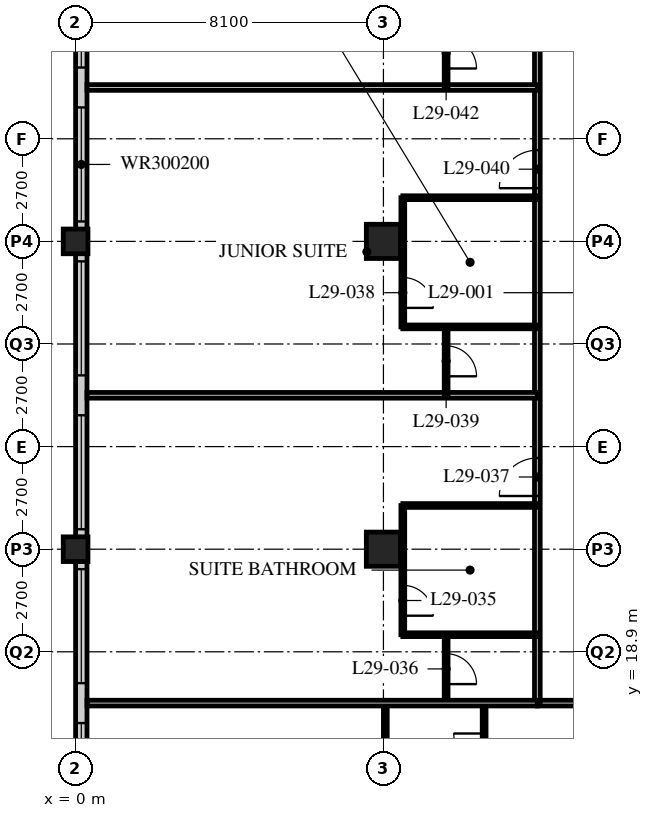
"""IFC4 building model, lengths in metres.
Left out: names, types, materials, properties, quantities, classifications, styles, units other than length and angle.
Written with IfcOpenShell. Run it as: python <this file> out.ifc"""

import sys

from ifc_helpers import new_model, si_unit, direction, frame, frame_2d, origin, origin_2d, place, context, subcontext, project, spatial, rectangle, hollow_rectangle, extrude, element, fill, save


model = new_model("IFC4")
c1 = context("Model", 3, precision=1e-05, world=origin(), true_north=direction((0.0, 1.0)))
c2 = subcontext(c1, "Body", "Model", "MODEL_VIEW")
j1 = project(units=[si_unit("LENGTHUNIT", "METRE"), si_unit("PLANEANGLEUNIT", "RADIAN")], contexts=[c1])
p1 = place(None, origin())
s1 = spatial("IfcSite", under=j1, at=p1, CompositionType="ELEMENT")
p2 = place(p1, origin())
s2 = spatial("IfcBuilding", under=s1, at=p2, CompositionType="ELEMENT")
p3 = place(p2, frame((0.0, 0.0, 117.0)))
s3 = spatial("IfcBuildingStorey", under=s2, at=p3, CompositionType="ELEMENT", Elevation=117.0)
for number, where, z_axis, x_axis in (
    (1, (0.0, 21.6, 0.0), (0.0, 0.0, 1.0), (1.0, 0.0, 0.0)),
    (2, (0.0, 29.7, 0.0), (0.0, 0.0, 1.0), (1.0, 0.0, 0.0)),
):
    element("IfcColumn", number, at=place(p3, frame(where, z_axis=z_axis, x_axis=x_axis)), inside=s3, PredefinedType="COLUMN", context=c2, shape_type="SweptSolid", body=[
        extrude(hollow_rectangle(XDim=0.65, YDim=0.65, WallThickness=0.055, at=origin_2d()), origin(), (0.0, 0.0, 1.0), 3.4),
    ])
for number, where, z_axis, x_axis in (
    (3, (8.1, 21.6, 0.0), (0.0, 0.0, 1.0), (1.0, 0.0, 0.0)),
    (4, (8.1, 29.7, 0.0), (0.0, 0.0, 1.0), (1.0, 0.0, 0.0)),
):
    element("IfcColumn", number, at=place(p3, frame(where, z_axis=z_axis, x_axis=x_axis)), inside=s3, PredefinedType="COLUMN", context=c2, shape_type="SweptSolid", body=[
        extrude(hollow_rectangle(XDim=0.9, YDim=0.9, WallThickness=0.09, at=origin_2d()), origin(), (0.0, 0.0, 1.0), 3.4),
    ])
p4 = place(p3, frame((0.15, 45.6, 0.0), z_axis=(0.0, 0.0, 1.0), x_axis=(0.0, -1.0, 0.0)))
e5 = element("IfcWall", 5, at=p4, inside=s3, PredefinedType="SOLIDWALL", context=c2, shape_type="SweptSolid", body=[
    extrude(rectangle(XDim=32.1, YDim=0.3, at=frame_2d((16.05, 0.0))), origin(), (0.0, 0.0, 1.0), 3.19),
])
p5 = place(p4, frame((0.225, 0.0, 0.9)))
e6 = element("IfcOpeningElement", 6, at=p5, cuts=e5, PredefinedType="OPENING", context=c2, shape_type="SweptSolid", body=[
    extrude(rectangle(XDim=3.0, YDim=2.0, at=frame_2d((1.5, 1.0))), frame((0.0, 0.16, 0.0), z_axis=(0.0, -1.0, 0.0), x_axis=(1.0, 0.0, 0.0)), (0.0, 0.0, 1.0), 0.32),
])
p6 = place(p4, frame((4.275, 0.0, 0.9)))
e7 = element("IfcOpeningElement", 7, at=p6, cuts=e5, PredefinedType="OPENING", context=c2, shape_type="SweptSolid", body=[
    extrude(rectangle(XDim=3.0, YDim=2.0, at=frame_2d((1.5, 1.0))), frame((0.0, 0.16, 0.0), z_axis=(0.0, -1.0, 0.0), x_axis=(1.0, 0.0, 0.0)), (0.0, 0.0, 1.0), 0.32),
])
p7 = place(p4, frame((8.325, 0.0, 0.9)))
e8 = element("IfcOpeningElement", 8, at=p7, cuts=e5, PredefinedType="OPENING", context=c2, shape_type="SweptSolid", body=[
    extrude(rectangle(XDim=3.0, YDim=2.0, at=frame_2d((1.5, 1.0))), frame((0.0, 0.16, 0.0), z_axis=(0.0, -1.0, 0.0), x_axis=(1.0, 0.0, 0.0)), (0.0, 0.0, 1.0), 0.32),
])
p8 = place(p4, frame((12.375, 0.0, 0.9)))
e9 = element("IfcOpeningElement", 9, at=p8, cuts=e5, PredefinedType="OPENING", context=c2, shape_type="SweptSolid", body=[
    extrude(rectangle(XDim=3.0, YDim=2.0, at=frame_2d((1.5, 1.0))), frame((0.0, 0.16, 0.0), z_axis=(0.0, -1.0, 0.0), x_axis=(1.0, 0.0, 0.0)), (0.0, 0.0, 1.0), 0.32),
])
p9 = place(p4, frame((16.425, 0.0, 0.9)))
e10 = element("IfcOpeningElement", 10, at=p9, cuts=e5, PredefinedType="OPENING", context=c2, shape_type="SweptSolid", body=[
    extrude(rectangle(XDim=3.0, YDim=2.0, at=frame_2d((1.5, 1.0))), frame((0.0, 0.16, 0.0), z_axis=(0.0, -1.0, 0.0), x_axis=(1.0, 0.0, 0.0)), (0.0, 0.0, 1.0), 0.32),
])
p10 = place(p4, frame((20.475, 0.0, 0.9)))
e11 = element("IfcOpeningElement", 11, at=p10, cuts=e5, PredefinedType="OPENING", context=c2, shape_type="SweptSolid", body=[
    extrude(rectangle(XDim=3.0, YDim=2.0, at=frame_2d((1.5, 1.0))), frame((0.0, 0.16, 0.0), z_axis=(0.0, -1.0, 0.0), x_axis=(1.0, 0.0, 0.0)), (0.0, 0.0, 1.0), 0.32),
])
p11 = place(p4, frame((24.525, 0.0, 0.9)))
e12 = element("IfcOpeningElement", 12, at=p11, cuts=e5, PredefinedType="OPENING", context=c2, shape_type="SweptSolid", body=[
    extrude(rectangle(XDim=3.0, YDim=2.0, at=frame_2d((1.5, 1.0))), frame((0.0, 0.16, 0.0), z_axis=(0.0, -1.0, 0.0), x_axis=(1.0, 0.0, 0.0)), (0.0, 0.0, 1.0), 0.32),
])
p12 = place(p4, frame((28.575, 0.0, 0.9)))
e13 = element("IfcOpeningElement", 13, at=p12, cuts=e5, PredefinedType="OPENING", context=c2, shape_type="SweptSolid", body=[
    extrude(rectangle(XDim=3.0, YDim=2.0, at=frame_2d((1.5, 1.0))), frame((0.0, 0.16, 0.0), z_axis=(0.0, -1.0, 0.0), x_axis=(1.0, 0.0, 0.0)), (0.0, 0.0, 1.0), 0.32),
])
p13 = place(p3, frame((12.15, 17.55, 0.0), z_axis=(0.0, 0.0, 1.0), x_axis=(1.0, 0.0, 0.0)))
e14 = element("IfcWall", 14, at=p13, inside=s3, PredefinedType="PARTITIONING", context=c2, shape_type="SweptSolid", body=[
    extrude(rectangle(XDim=32.4, YDim=0.15, at=frame_2d((16.2, 0.0))), origin(), (0.0, 0.0, 1.0), 3.19),
])
p14 = place(p13, frame((5.95, 0.0, 0.0)))
e15 = element("IfcOpeningElement", 15, at=p14, cuts=e14, PredefinedType="OPENING", context=c2, shape_type="SweptSolid", body=[
    extrude(rectangle(XDim=1.0, YDim=2.1, at=frame_2d((0.5, 1.05))), frame((0.0, 0.085, 0.0), z_axis=(0.0, -1.0, 0.0), x_axis=(1.0, 0.0, 0.0)), (0.0, 0.0, 1.0), 0.17),
])
p15 = place(p13, frame((17.725, 0.0, 0.0)))
e16 = element("IfcOpeningElement", 16, at=p15, cuts=e14, PredefinedType="OPENING", context=c2, shape_type="SweptSolid", body=[
    extrude(rectangle(XDim=1.0, YDim=2.1, at=frame_2d((0.5, 1.05))), frame((0.0, 0.085, 0.0), z_axis=(0.0, -1.0, 0.0), x_axis=(1.0, 0.0, 0.0)), (0.0, 0.0, 1.0), 0.17),
])
p16 = place(p13, frame((26.75, 0.0, 0.0)))
e17 = element("IfcOpeningElement", 17, at=p16, cuts=e14, PredefinedType="OPENING", context=c2, shape_type="SweptSolid", body=[
    extrude(rectangle(XDim=1.0, YDim=2.1, at=frame_2d((0.5, 1.05))), frame((0.0, 0.085, 0.0), z_axis=(0.0, -1.0, 0.0), x_axis=(1.0, 0.0, 0.0)), (0.0, 0.0, 1.0), 0.17),
])
p17 = place(p13, frame((1.525, 0.0, 0.0)))
e18 = element("IfcOpeningElement", 18, at=p17, cuts=e14, PredefinedType="OPENING", context=c2, shape_type="SweptSolid", body=[
    extrude(rectangle(XDim=1.0, YDim=2.1, at=frame_2d((0.5, 1.05))), frame((0.0, 0.085, 0.0), z_axis=(0.0, -1.0, 0.0), x_axis=(1.0, 0.0, 0.0)), (0.0, 0.0, 1.0), 0.17),
])
p18 = place(p13, frame((29.875, 0.0, 0.0)))
e19 = element("IfcOpeningElement", 19, at=p18, cuts=e14, PredefinedType="OPENING", context=c2, shape_type="SweptSolid", body=[
    extrude(rectangle(XDim=1.0, YDim=2.1, at=frame_2d((0.5, 1.05))), frame((0.0, 0.085, 0.0), z_axis=(0.0, -1.0, 0.0), x_axis=(1.0, 0.0, 0.0)), (0.0, 0.0, 1.0), 0.17),
])
p19 = place(p3, frame((12.15, 17.55, 0.0), z_axis=(0.0, 0.0, 1.0), x_axis=(0.0, 1.0, 0.0)))
e20 = element("IfcWall", 20, at=p19, inside=s3, PredefinedType="PARTITIONING", context=c2, shape_type="SweptSolid", body=[
    extrude(rectangle(XDim=28.35, YDim=0.15, at=frame_2d((14.175, 0.0))), origin(), (0.0, 0.0, 1.0), 3.19),
])
p20 = place(p19, frame((5.45, 0.0, 0.0)))
e21 = element("IfcOpeningElement", 21, at=p20, cuts=e20, PredefinedType="OPENING", context=c2, shape_type="SweptSolid", body=[
    extrude(rectangle(XDim=1.0, YDim=2.1, at=frame_2d((0.5, 1.05))), frame((0.0, 0.085, 0.0), z_axis=(0.0, -1.0, 0.0), x_axis=(1.0, 0.0, 0.0)), (0.0, 0.0, 1.0), 0.17),
])
p21 = place(p19, frame((13.55, 0.0, 0.0)))
e22 = element("IfcOpeningElement", 22, at=p21, cuts=e20, PredefinedType="OPENING", context=c2, shape_type="SweptSolid", body=[
    extrude(rectangle(XDim=1.0, YDim=2.1, at=frame_2d((0.5, 1.05))), frame((0.0, 0.085, 0.0), z_axis=(0.0, -1.0, 0.0), x_axis=(1.0, 0.0, 0.0)), (0.0, 0.0, 1.0), 0.17),
])
p22 = place(p19, frame((21.65, 0.0, 0.0)))
e23 = element("IfcOpeningElement", 23, at=p22, cuts=e20, PredefinedType="OPENING", context=c2, shape_type="SweptSolid", body=[
    extrude(rectangle(XDim=1.0, YDim=2.1, at=frame_2d((0.5, 1.05))), frame((0.0, 0.085, 0.0), z_axis=(0.0, -1.0, 0.0), x_axis=(1.0, 0.0, 0.0)), (0.0, 0.0, 1.0), 0.17),
])
p23 = place(p19, frame((26.75, 0.0, 0.0)))
e24 = element("IfcOpeningElement", 24, at=p23, cuts=e20, PredefinedType="OPENING", context=c2, shape_type="SweptSolid", body=[
    extrude(rectangle(XDim=1.0, YDim=2.1, at=frame_2d((0.5, 1.05))), frame((0.0, 0.085, 0.0), z_axis=(0.0, -1.0, 0.0), x_axis=(1.0, 0.0, 0.0)), (0.0, 0.0, 1.0), 0.17),
])
p24 = place(p3, frame((8.61, 19.35, 0.0), z_axis=(0.0, 0.0, 1.0), x_axis=(0.0, 1.0, 0.0)))
e25 = element("IfcWall", 25, at=p24, inside=s3, PredefinedType="PARTITIONING", context=c2, shape_type="SweptSolid", body=[
    extrude(rectangle(XDim=3.4, YDim=0.1, at=frame_2d((1.7, 0.0))), origin(), (0.0, 0.0, 1.0), 3.19),
])
p25 = place(p24, frame((0.5, 0.0, 0.0)))
e26 = element("IfcOpeningElement", 26, at=p25, cuts=e25, PredefinedType="OPENING", context=c2, shape_type="SweptSolid", body=[
    extrude(rectangle(XDim=0.8, YDim=2.1, at=frame_2d((0.4, 1.05))), frame((0.0, 0.06, 0.0), z_axis=(0.0, -1.0, 0.0), x_axis=(1.0, 0.0, 0.0)), (0.0, 0.0, 1.0), 0.12),
])
p26 = place(p3, frame((9.75, 17.55, 0.0), z_axis=(0.0, 0.0, 1.0), x_axis=(0.0, 1.0, 0.0)))
e27 = element("IfcWall", 27, at=p26, inside=s3, PredefinedType="PARTITIONING", context=c2, shape_type="SweptSolid", body=[
    extrude(rectangle(XDim=1.8, YDim=0.1, at=frame_2d((0.9, 0.0))), origin(), (0.0, 0.0, 1.0), 3.19),
])
p27 = place(p26, frame((0.5, 0.0, 0.0)))
e28 = element("IfcOpeningElement", 28, at=p27, cuts=e27, PredefinedType="OPENING", context=c2, shape_type="SweptSolid", body=[
    extrude(rectangle(XDim=0.8, YDim=2.1, at=frame_2d((0.4, 1.05))), frame((0.0, 0.06, 0.0), z_axis=(0.0, -1.0, 0.0), x_axis=(1.0, 0.0, 0.0)), (0.0, 0.0, 1.0), 0.12),
])
for number, where, z_axis, x_axis in (
    (29, (12.15, 19.35, 0.0), (0.0, 0.0, 1.0), (-1.0, 0.0, 0.0)),
    (30, (12.15, 22.75, 0.0), (0.0, 0.0, 1.0), (-1.0, 0.0, 0.0)),
):
    element("IfcWall", number, at=place(p3, frame(where, z_axis=z_axis, x_axis=x_axis)), inside=s3, PredefinedType="PARTITIONING", context=c2, shape_type="SweptSolid", body=[
        extrude(rectangle(XDim=3.54, YDim=0.1, at=frame_2d((1.77, 0.0))), origin(), (0.0, 0.0, 1.0), 3.19),
    ])
p28 = place(p3, frame((12.15, 25.65, 0.0), z_axis=(0.0, 0.0, 1.0), x_axis=(-1.0, 0.0, 0.0)))
e31 = element("IfcWall", 31, at=p28, inside=s3, PredefinedType="PARTITIONING", context=c2, shape_type="SweptSolid", body=[
    extrude(rectangle(XDim=11.85, YDim=0.15, at=frame_2d((5.925, 0.0))), origin(), (0.0, 0.0, 1.0), 3.19),
])
p29 = place(p3, frame((8.61, 27.45, 0.0), z_axis=(0.0, 0.0, 1.0), x_axis=(0.0, 1.0, 0.0)))
e32 = element("IfcWall", 32, at=p29, inside=s3, PredefinedType="PARTITIONING", context=c2, shape_type="SweptSolid", body=[
    extrude(rectangle(XDim=3.4, YDim=0.1, at=frame_2d((1.7, 0.0))), origin(), (0.0, 0.0, 1.0), 3.19),
])
p30 = place(p29, frame((0.5, 0.0, 0.0)))
e33 = element("IfcOpeningElement", 33, at=p30, cuts=e32, PredefinedType="OPENING", context=c2, shape_type="SweptSolid", body=[
    extrude(rectangle(XDim=0.8, YDim=2.1, at=frame_2d((0.4, 1.05))), frame((0.0, 0.06, 0.0), z_axis=(0.0, -1.0, 0.0), x_axis=(1.0, 0.0, 0.0)), (0.0, 0.0, 1.0), 0.12),
])
p31 = place(p3, frame((9.75, 25.65, 0.0), z_axis=(0.0, 0.0, 1.0), x_axis=(0.0, 1.0, 0.0)))
e34 = element("IfcWall", 34, at=p31, inside=s3, PredefinedType="PARTITIONING", context=c2, shape_type="SweptSolid", body=[
    extrude(rectangle(XDim=1.8, YDim=0.1, at=frame_2d((0.9, 0.0))), origin(), (0.0, 0.0, 1.0), 3.19),
])
p32 = place(p31, frame((0.5, 0.0, 0.0)))
e35 = element("IfcOpeningElement", 35, at=p32, cuts=e34, PredefinedType="OPENING", context=c2, shape_type="SweptSolid", body=[
    extrude(rectangle(XDim=0.8, YDim=2.1, at=frame_2d((0.4, 1.05))), frame((0.0, 0.06, 0.0), z_axis=(0.0, -1.0, 0.0), x_axis=(1.0, 0.0, 0.0)), (0.0, 0.0, 1.0), 0.12),
])
for number, where, z_axis, x_axis in (
    (36, (12.15, 27.45, 0.0), (0.0, 0.0, 1.0), (-1.0, 0.0, 0.0)),
    (37, (12.15, 30.85, 0.0), (0.0, 0.0, 1.0), (-1.0, 0.0, 0.0)),
):
    element("IfcWall", number, at=place(p3, frame(where, z_axis=z_axis, x_axis=x_axis)), inside=s3, PredefinedType="PARTITIONING", context=c2, shape_type="SweptSolid", body=[
        extrude(rectangle(XDim=3.54, YDim=0.1, at=frame_2d((1.77, 0.0))), origin(), (0.0, 0.0, 1.0), 3.19),
    ])
p33 = place(p3, frame((12.15, 33.75, 0.0), z_axis=(0.0, 0.0, 1.0), x_axis=(-1.0, 0.0, 0.0)))
e38 = element("IfcWall", 38, at=p33, inside=s3, PredefinedType="PARTITIONING", context=c2, shape_type="SweptSolid", body=[
    extrude(rectangle(XDim=11.85, YDim=0.15, at=frame_2d((5.925, 0.0))), origin(), (0.0, 0.0, 1.0), 3.19),
])
p34 = place(p3, frame((9.75, 33.75, 0.0), z_axis=(0.0, 0.0, 1.0), x_axis=(0.0, 1.0, 0.0)))
e39 = element("IfcWall", 39, at=p34, inside=s3, PredefinedType="PARTITIONING", context=c2, shape_type="SweptSolid", body=[
    extrude(rectangle(XDim=1.8, YDim=0.1, at=frame_2d((0.9, 0.0))), origin(), (0.0, 0.0, 1.0), 3.19),
])
p35 = place(p34, frame((0.5, 0.0, 0.0)))
e40 = element("IfcOpeningElement", 40, at=p35, cuts=e39, PredefinedType="OPENING", context=c2, shape_type="SweptSolid", body=[
    extrude(rectangle(XDim=0.8, YDim=2.1, at=frame_2d((0.4, 1.05))), frame((0.0, 0.06, 0.0), z_axis=(0.0, -1.0, 0.0), x_axis=(1.0, 0.0, 0.0)), (0.0, 0.0, 1.0), 0.12),
])
p36 = place(p3, frame((10.75, 17.55, 0.0), z_axis=(0.0, 0.0, 1.0), x_axis=(0.0, -1.0, 0.0)))
e41 = element("IfcWall", 41, at=p36, inside=s3, PredefinedType="PARTITIONING", context=c2, shape_type="SweptSolid", body=[
    extrude(rectangle(XDim=2.4, YDim=0.1, at=frame_2d((1.2, 0.0))), origin(), (0.0, 0.0, 1.0), 3.19),
])
p37 = place(p36, frame((0.8, 0.0, 0.0)))
e42 = element("IfcOpeningElement", 42, at=p37, cuts=e41, PredefinedType="OPENING", context=c2, shape_type="SweptSolid", body=[
    extrude(rectangle(XDim=0.8, YDim=2.1, at=frame_2d((0.4, 1.05))), frame((0.0, 0.06, 0.0), z_axis=(0.0, -1.0, 0.0), x_axis=(1.0, 0.0, 0.0)), (0.0, 0.0, 1.0), 0.12),
])
p38 = place(p3, frame((8.15, 17.55, 0.0), z_axis=(0.0, 0.0, 1.0), x_axis=(0.0, -1.0, 0.0)))
e43 = element("IfcWall", 43, at=p38, inside=s3, PredefinedType="PARTITIONING", context=c2, shape_type="SweptSolid", body=[
    extrude(rectangle(XDim=2.4, YDim=0.1, at=frame_2d((1.2, 0.0))), origin(), (0.0, 0.0, 1.0), 2.578),
])
p39 = place(p3, frame((0.3, 17.55, 0.0), z_axis=(0.0, 0.0, 1.0), x_axis=(1.0, 0.0, 0.0)))
e44 = element("IfcWall", 44, at=p39, inside=s3, PredefinedType="PARTITIONING", context=c2, shape_type="SweptSolid", body=[
    extrude(rectangle(XDim=11.85, YDim=0.15, at=frame_2d((5.925, 0.0))), origin(), (0.0, 0.0, 1.0), 3.19),
])
p40 = place(p7, origin())
e45 = element("IfcWindow", 45, at=p40, inside=s3, PartitioningType="SINGLE_PANEL", PredefinedType="WINDOW", context=c2, shape_type="SweptSolid", body=[
    extrude(rectangle(XDim=3.0, YDim=2.0, at=frame_2d((1.5, 1.0))), frame((0.0, 0.03, 0.0), z_axis=(0.0, -1.0, 0.0), x_axis=(1.0, 0.0, 0.0)), (0.0, 0.0, 1.0), 0.06),
])
fill(e8, e45)
p41 = place(p8, origin())
e46 = element("IfcWindow", 46, at=p41, inside=s3, PartitioningType="SINGLE_PANEL", PredefinedType="WINDOW", context=c2, shape_type="SweptSolid", body=[
    extrude(rectangle(XDim=3.0, YDim=2.0, at=frame_2d((1.5, 1.0))), frame((0.0, 0.03, 0.0), z_axis=(0.0, -1.0, 0.0), x_axis=(1.0, 0.0, 0.0)), (0.0, 0.0, 1.0), 0.06),
])
fill(e9, e46)
p42 = place(p9, origin())
e47 = element("IfcWindow", 47, at=p42, inside=s3, PartitioningType="SINGLE_PANEL", PredefinedType="WINDOW", context=c2, shape_type="SweptSolid", body=[
    extrude(rectangle(XDim=3.0, YDim=2.0, at=frame_2d((1.5, 1.0))), frame((0.0, 0.03, 0.0), z_axis=(0.0, -1.0, 0.0), x_axis=(1.0, 0.0, 0.0)), (0.0, 0.0, 1.0), 0.06),
])
fill(e10, e47)
p43 = place(p10, origin())
e48 = element("IfcWindow", 48, at=p43, inside=s3, PartitioningType="SINGLE_PANEL", PredefinedType="WINDOW", context=c2, shape_type="SweptSolid", body=[
    extrude(rectangle(XDim=3.0, YDim=2.0, at=frame_2d((1.5, 1.0))), frame((0.0, 0.03, 0.0), z_axis=(0.0, -1.0, 0.0), x_axis=(1.0, 0.0, 0.0)), (0.0, 0.0, 1.0), 0.06),
])
fill(e11, e48)
p44 = place(p11, origin())
e49 = element("IfcWindow", 49, at=p44, inside=s3, PartitioningType="SINGLE_PANEL", PredefinedType="WINDOW", context=c2, shape_type="SweptSolid", body=[
    extrude(rectangle(XDim=3.0, YDim=2.0, at=frame_2d((1.5, 1.0))), frame((0.0, 0.03, 0.0), z_axis=(0.0, -1.0, 0.0), x_axis=(1.0, 0.0, 0.0)), (0.0, 0.0, 1.0), 0.06),
])
fill(e12, e49)
p45 = place(p12, origin())
e50 = element("IfcWindow", 50, at=p45, inside=s3, PartitioningType="SINGLE_PANEL", PredefinedType="WINDOW", context=c2, shape_type="SweptSolid", body=[
    extrude(rectangle(XDim=3.0, YDim=2.0, at=frame_2d((1.5, 1.0))), frame((0.0, 0.03, 0.0), z_axis=(0.0, -1.0, 0.0), x_axis=(1.0, 0.0, 0.0)), (0.0, 0.0, 1.0), 0.06),
])
fill(e13, e50)
p46 = place(p25, origin())
e51 = element("IfcDoor", 51, at=p46, inside=s3, OperationType="SINGLE_SWING_RIGHT", PredefinedType="DOOR", context=c2, shape_type="SweptSolid", body=[
    extrude(rectangle(XDim=0.8, YDim=2.1, at=frame_2d((0.4, 1.05))), frame((0.0, 0.025, 0.0), z_axis=(0.0, -1.0, 0.0), x_axis=(1.0, 0.0, 0.0)), (0.0, 0.0, 1.0), 0.05),
])
fill(e26, e51)
p47 = place(p27, origin())
e52 = element("IfcDoor", 52, at=p47, inside=s3, OperationType="SINGLE_SWING_RIGHT", PredefinedType="DOOR", context=c2, shape_type="SweptSolid", body=[
    extrude(rectangle(XDim=0.8, YDim=2.1, at=frame_2d((0.4, 1.05))), frame((0.0, 0.025, 0.0), z_axis=(0.0, -1.0, 0.0), x_axis=(1.0, 0.0, 0.0)), (0.0, 0.0, 1.0), 0.05),
])
fill(e28, e52)
p48 = place(p20, origin())
e53 = element("IfcDoor", 53, at=p48, inside=s3, OperationType="SINGLE_SWING_LEFT", PredefinedType="DOOR", context=c2, shape_type="SweptSolid", body=[
    extrude(rectangle(XDim=1.0, YDim=2.1, at=frame_2d((0.5, 1.05))), frame((0.0, 0.025, 0.0), z_axis=(0.0, -1.0, 0.0), x_axis=(1.0, 0.0, 0.0)), (0.0, 0.0, 1.0), 0.05),
])
fill(e21, e53)
p49 = place(p30, origin())
e54 = element("IfcDoor", 54, at=p49, inside=s3, OperationType="SINGLE_SWING_RIGHT", PredefinedType="DOOR", context=c2, shape_type="SweptSolid", body=[
    extrude(rectangle(XDim=0.8, YDim=2.1, at=frame_2d((0.4, 1.05))), frame((0.0, 0.025, 0.0), z_axis=(0.0, -1.0, 0.0), x_axis=(1.0, 0.0, 0.0)), (0.0, 0.0, 1.0), 0.05),
])
fill(e33, e54)
p50 = place(p32, origin())
e55 = element("IfcDoor", 55, at=p50, inside=s3, OperationType="SINGLE_SWING_RIGHT", PredefinedType="DOOR", context=c2, shape_type="SweptSolid", body=[
    extrude(rectangle(XDim=0.8, YDim=2.1, at=frame_2d((0.4, 1.05))), frame((0.0, 0.025, 0.0), z_axis=(0.0, -1.0, 0.0), x_axis=(1.0, 0.0, 0.0)), (0.0, 0.0, 1.0), 0.05),
])
fill(e35, e55)
p51 = place(p21, origin())
e56 = element("IfcDoor", 56, at=p51, inside=s3, OperationType="SINGLE_SWING_LEFT", PredefinedType="DOOR", context=c2, shape_type="SweptSolid", body=[
    extrude(rectangle(XDim=1.0, YDim=2.1, at=frame_2d((0.5, 1.05))), frame((0.0, 0.025, 0.0), z_axis=(0.0, -1.0, 0.0), x_axis=(1.0, 0.0, 0.0)), (0.0, 0.0, 1.0), 0.05),
])
fill(e22, e56)
p52 = place(p35, origin())
e57 = element("IfcDoor", 57, at=p52, inside=s3, OperationType="SINGLE_SWING_RIGHT", PredefinedType="DOOR", context=c2, shape_type="SweptSolid", body=[
    extrude(rectangle(XDim=0.8, YDim=2.1, at=frame_2d((0.4, 1.05))), frame((0.0, 0.025, 0.0), z_axis=(0.0, -1.0, 0.0), x_axis=(1.0, 0.0, 0.0)), (0.0, 0.0, 1.0), 0.05),
])
fill(e40, e57)
p53 = place(p37, origin())
e58 = element("IfcDoor", 58, at=p53, inside=s3, OperationType="SINGLE_SWING_RIGHT", PredefinedType="DOOR", context=c2, shape_type="SweptSolid", body=[
    extrude(rectangle(XDim=0.8, YDim=2.1, at=frame_2d((0.4, 1.05))), frame((0.0, 0.025, 0.0), z_axis=(0.0, -1.0, 0.0), x_axis=(1.0, 0.0, 0.0)), (0.0, 0.0, 1.0), 0.05),
])
fill(e42, e58)
save(model, sys.argv[1])
